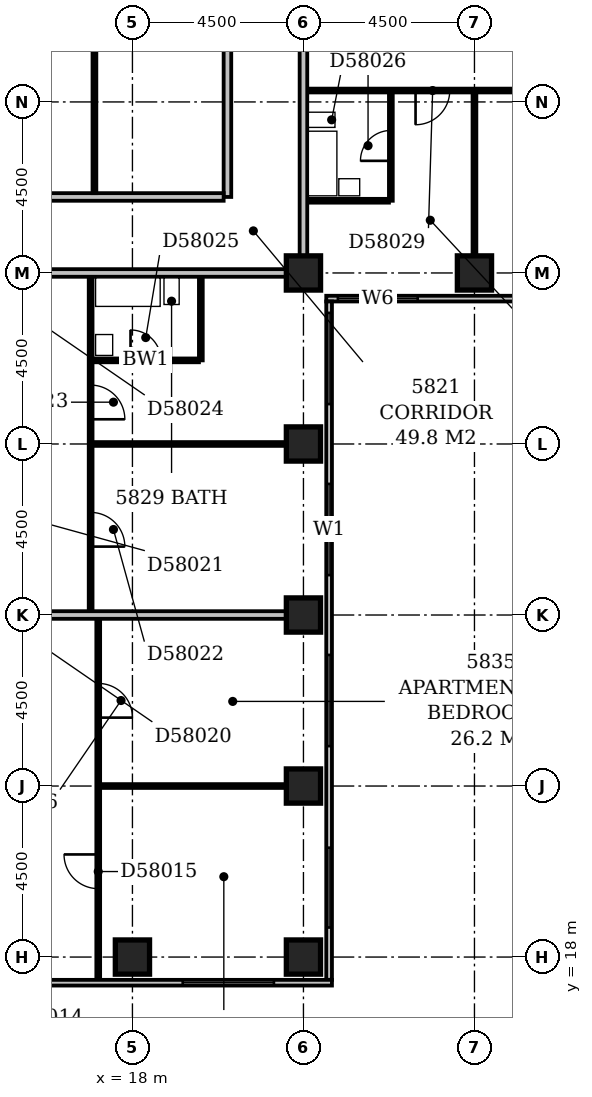
"""IFC4 building model, lengths in metres.
Left out: names, types, materials, properties, quantities, classifications, styles, units other than length and angle.
Written with IfcOpenShell. Run it as: python <this file> out.ifc"""

import sys

from ifc_helpers import new_model, si_unit, direction, frame, frame_2d, origin, origin_2d, place, context, subcontext, project, spatial, rectangle, extrude, element, fill, save


model = new_model("IFC4")
c1 = context("Model", 3, precision=1e-05, world=origin(), true_north=direction((0.0, 1.0)))
c2 = subcontext(c1, "Body", "Model", "MODEL_VIEW")
j1 = project(units=[si_unit("LENGTHUNIT", "METRE"), si_unit("PLANEANGLEUNIT", "RADIAN")], contexts=[c1])
p1 = place(None, origin())
s1 = spatial("IfcSite", under=j1, at=p1, CompositionType="ELEMENT")
p2 = place(p1, origin())
s2 = spatial("IfcBuilding", under=s1, at=p2, CompositionType="ELEMENT")
p3 = place(p2, frame((0.0, 0.0, 225.8)))
s3 = spatial("IfcBuildingStorey", under=s2, at=p3, CompositionType="ELEMENT", Elevation=225.8)
for number, where, z_axis, x_axis in (
    (1, (18.0, 18.0, -0.3), (0.0, 0.0, 1.0), (1.0, 0.0, 0.0)),
    (2, (22.5, 18.0, -0.3), (0.0, 0.0, 1.0), (1.0, 0.0, 0.0)),
    (3, (22.5, 22.5, -0.3), (0.0, 0.0, 1.0), (1.0, 0.0, 0.0)),
    (4, (22.5, 27.0, -0.3), (0.0, 0.0, 1.0), (1.0, 0.0, 0.0)),
    (5, (22.5, 31.5, -0.3), (0.0, 0.0, 1.0), (1.0, 0.0, 0.0)),
    (6, (22.5, 36.0, -0.3), (0.0, 0.0, 1.0), (1.0, 0.0, 0.0)),
    (7, (27.0, 36.0, -0.3), (0.0, 0.0, 1.0), (1.0, 0.0, 0.0)),
):
    element("IfcColumn", number, at=place(p3, frame(where, z_axis=z_axis, x_axis=x_axis)), inside=s3, PredefinedType="COLUMN", context=c2, shape_type="SweptSolid", body=[
        extrude(rectangle(XDim=0.9, YDim=0.9, at=origin_2d()), origin(), (0.0, 0.0, 1.0), 3.6),
    ])
p4 = place(p3, frame((3.9, 17.325, 0.0), z_axis=(0.0, 0.0, 1.0), x_axis=(1.0, 0.0, 0.0)))
e8 = element("IfcWall", 8, at=p4, inside=s3, PredefinedType="STANDARD", context=c2, shape_type="SweptSolid", body=[
    extrude(rectangle(XDim=19.35, YDim=0.15, at=frame_2d((9.675, 0.0))), origin(), (0.0, 0.0, 1.0), 2.7),
])
p5 = place(p4, frame((6.15, 0.0, 0.6)))
e9 = element("IfcOpeningElement", 9, at=p5, cuts=e8, PredefinedType="OPENING", context=c2, shape_type="SweptSolid", body=[
    extrude(rectangle(XDim=2.4, YDim=1.8, at=frame_2d((1.2, 0.9))), frame((0.0, 0.087, 0.0), z_axis=(0.0, -1.0, 0.0), x_axis=(1.0, 0.0, 0.0)), (0.0, 0.0, 1.0), 0.174),
])
p6 = place(p4, frame((15.423, 0.0, 0.6)))
e10 = element("IfcOpeningElement", 10, at=p6, cuts=e8, PredefinedType="OPENING", context=c2, shape_type="SweptSolid", body=[
    extrude(rectangle(XDim=2.4, YDim=1.8, at=frame_2d((1.2, 0.9))), frame((0.0, 0.087, 0.0), z_axis=(0.0, -1.0, 0.0), x_axis=(1.0, 0.0, 0.0)), (0.0, 0.0, 1.0), 0.174),
])
p7 = place(p3, frame((23.175, 17.4, 0.0), z_axis=(0.0, 0.0, 1.0), x_axis=(0.0, 1.0, 0.0)))
e11 = element("IfcWall", 11, at=p7, inside=s3, PredefinedType="STANDARD", context=c2, shape_type="SweptSolid", body=[
    extrude(rectangle(XDim=17.85, YDim=0.15, at=frame_2d((8.925, 0.0))), origin(), (0.0, 0.0, 1.0), 2.7),
])
p8 = place(p7, frame((1.377, 0.0, 0.6)))
e12 = element("IfcOpeningElement", 12, at=p8, cuts=e11, PredefinedType="OPENING", context=c2, shape_type="SweptSolid", body=[
    extrude(rectangle(XDim=2.1, YDim=1.8, at=frame_2d((1.05, 0.9))), frame((0.0, 0.087, 0.0), z_axis=(0.0, -1.0, 0.0), x_axis=(1.0, 0.0, 0.0)), (0.0, 0.0, 1.0), 0.174),
])
p9 = place(p7, frame((6.15, 0.0, 0.6)))
e13 = element("IfcOpeningElement", 13, at=p9, cuts=e11, PredefinedType="OPENING", context=c2, shape_type="SweptSolid", body=[
    extrude(rectangle(XDim=2.4, YDim=1.8, at=frame_2d((1.2, 0.9))), frame((0.0, 0.087, 0.0), z_axis=(0.0, -1.0, 0.0), x_axis=(1.0, 0.0, 0.0)), (0.0, 0.0, 1.0), 0.174),
])
p10 = place(p7, frame((10.65, 0.0, 0.6)))
e14 = element("IfcOpeningElement", 14, at=p10, cuts=e11, PredefinedType="OPENING", context=c2, shape_type="SweptSolid", body=[
    extrude(rectangle(XDim=2.4, YDim=1.8, at=frame_2d((1.2, 0.9))), frame((0.0, 0.087, 0.0), z_axis=(0.0, -1.0, 0.0), x_axis=(1.0, 0.0, 0.0)), (0.0, 0.0, 1.0), 0.174),
])
p11 = place(p7, frame((15.15, 0.0, 0.6)))
e15 = element("IfcOpeningElement", 15, at=p11, cuts=e11, PredefinedType="OPENING", context=c2, shape_type="SweptSolid", body=[
    extrude(rectangle(XDim=2.4, YDim=1.8, at=frame_2d((1.2, 0.9))), frame((0.0, 0.087, 0.0), z_axis=(0.0, -1.0, 0.0), x_axis=(1.0, 0.0, 0.0)), (0.0, 0.0, 1.0), 0.174),
])
p12 = place(p3, frame((23.1, 35.325, 0.0), z_axis=(0.0, 0.0, 1.0), x_axis=(1.0, 0.0, 0.0)))
e16 = element("IfcWall", 16, at=p12, inside=s3, PredefinedType="STANDARD", context=c2, shape_type="SweptSolid", body=[
    extrude(rectangle(XDim=27.15, YDim=0.15, at=frame_2d((13.575, 0.0))), origin(), (0.0, 0.0, 1.0), 2.7),
])
p13 = place(p12, frame((0.306, 0.0, 0.6)))
e17 = element("IfcOpeningElement", 17, at=p13, cuts=e16, PredefinedType="OPENING", context=c2, shape_type="SweptSolid", body=[
    extrude(rectangle(XDim=2.1, YDim=1.8, at=frame_2d((1.05, 0.9))), frame((0.0, 0.087, 0.0), z_axis=(0.0, -1.0, 0.0), x_axis=(1.0, 0.0, 0.0)), (0.0, 0.0, 1.0), 0.174),
])
p14 = place(p12, frame((4.95, 0.0, 0.6)))
e18 = element("IfcOpeningElement", 18, at=p14, cuts=e16, PredefinedType="OPENING", context=c2, shape_type="SweptSolid", body=[
    extrude(rectangle(XDim=2.4, YDim=1.8, at=frame_2d((1.2, 0.9))), frame((0.0, 0.087, 0.0), z_axis=(0.0, -1.0, 0.0), x_axis=(1.0, 0.0, 0.0)), (0.0, 0.0, 1.0), 0.174),
])
p15 = place(p12, frame((9.45, 0.0, 0.6)))
e19 = element("IfcOpeningElement", 19, at=p15, cuts=e16, PredefinedType="OPENING", context=c2, shape_type="SweptSolid", body=[
    extrude(rectangle(XDim=2.4, YDim=1.8, at=frame_2d((1.2, 0.9))), frame((0.0, 0.087, 0.0), z_axis=(0.0, -1.0, 0.0), x_axis=(1.0, 0.0, 0.0)), (0.0, 0.0, 1.0), 0.174),
])
p16 = place(p12, frame((13.95, 0.0, 0.6)))
e20 = element("IfcOpeningElement", 20, at=p16, cuts=e16, PredefinedType="OPENING", context=c2, shape_type="SweptSolid", body=[
    extrude(rectangle(XDim=2.4, YDim=1.8, at=frame_2d((1.2, 0.9))), frame((0.0, 0.087, 0.0), z_axis=(0.0, -1.0, 0.0), x_axis=(1.0, 0.0, 0.0)), (0.0, 0.0, 1.0), 0.174),
])
p17 = place(p12, frame((18.45, 0.0, 0.6)))
e21 = element("IfcOpeningElement", 21, at=p17, cuts=e16, PredefinedType="OPENING", context=c2, shape_type="SweptSolid", body=[
    extrude(rectangle(XDim=2.4, YDim=1.8, at=frame_2d((1.2, 0.9))), frame((0.0, 0.087, 0.0), z_axis=(0.0, -1.0, 0.0), x_axis=(1.0, 0.0, 0.0)), (0.0, 0.0, 1.0), 0.174),
])
p18 = place(p12, frame((24.157, 0.0, 0.6)))
e22 = element("IfcOpeningElement", 22, at=p18, cuts=e16, PredefinedType="OPENING", context=c2, shape_type="SweptSolid", body=[
    extrude(rectangle(XDim=1.5, YDim=1.8, at=frame_2d((0.75, 0.9))), frame((0.0, 0.087, 0.0), z_axis=(0.0, -1.0, 0.0), x_axis=(1.0, 0.0, 0.0)), (0.0, 0.0, 1.0), 0.174),
])
p19 = place(p3, frame((17.1, 17.4, 0.0), z_axis=(0.0, 0.0, 1.0), x_axis=(0.0, 1.0, 0.0)))
e23 = element("IfcWall", 23, at=p19, inside=s3, PredefinedType="PARTITIONING", context=c2, shape_type="SweptSolid", body=[
    extrude(rectangle(XDim=9.5, YDim=0.1, at=frame_2d((4.75, 0.0))), origin(), (0.0, 0.0, 1.0), 3.3),
])
p20 = place(p19, frame((2.4, 0.0, 0.0)))
e24 = element("IfcOpeningElement", 24, at=p20, cuts=e23, PredefinedType="OPENING", context=c2, shape_type="SweptSolid", body=[
    extrude(rectangle(XDim=0.9, YDim=2.1, at=frame_2d((0.45, 1.05))), frame((0.0, 0.062, 0.0), z_axis=(0.0, -1.0, 0.0), x_axis=(1.0, 0.0, 0.0)), (0.0, 0.0, 1.0), 0.124),
])
p21 = place(p19, frame((6.9, 0.0, 0.0)))
e25 = element("IfcOpeningElement", 25, at=p21, cuts=e23, PredefinedType="OPENING", context=c2, shape_type="SweptSolid", body=[
    extrude(rectangle(XDim=0.9, YDim=2.1, at=frame_2d((0.45, 1.05))), frame((0.0, 0.062, 0.0), z_axis=(0.0, -1.0, 0.0), x_axis=(1.0, 0.0, 0.0)), (0.0, 0.0, 1.0), 0.124),
])
p22 = place(p3, frame((17.15, 22.5, 0.0), z_axis=(0.0, 0.0, 1.0), x_axis=(1.0, 0.0, 0.0)))
e26 = element("IfcWall", 26, at=p22, inside=s3, PredefinedType="PARTITIONING", context=c2, shape_type="SweptSolid", body=[
    extrude(rectangle(XDim=4.9, YDim=0.1, at=frame_2d((2.45, 0.0))), origin(), (0.0, 0.0, 1.0), 3.3),
])
p23 = place(p3, frame((9.1, 27.0, 0.0), z_axis=(0.0, 0.0, 1.0), x_axis=(1.0, 0.0, 0.0)))
e27 = element("IfcWall", 27, at=p23, inside=s3, PredefinedType="PARTITIONING", context=c2, shape_type="SweptSolid", body=[
    extrude(rectangle(XDim=12.95, YDim=0.2, at=frame_2d((6.475, 0.0))), origin(), (0.0, 0.0, 1.0), 2.7),
])
p24 = place(p3, frame((16.9, 27.1, 0.0), z_axis=(0.0, 0.0, 1.0), x_axis=(0.0, 1.0, 0.0)))
e28 = element("IfcWall", 28, at=p24, inside=s3, PredefinedType="PARTITIONING", context=c2, shape_type="SweptSolid", body=[
    extrude(rectangle(XDim=8.8, YDim=0.1, at=frame_2d((4.4, 0.0))), origin(), (0.0, 0.0, 1.0), 3.3),
])
p25 = place(p24, frame((1.7, 0.0, 0.0)))
e29 = element("IfcOpeningElement", 29, at=p25, cuts=e28, PredefinedType="OPENING", context=c2, shape_type="SweptSolid", body=[
    extrude(rectangle(XDim=0.9, YDim=2.1, at=frame_2d((0.45, 1.05))), frame((0.0, 0.062, 0.0), z_axis=(0.0, -1.0, 0.0), x_axis=(1.0, 0.0, 0.0)), (0.0, 0.0, 1.0), 0.124),
])
p26 = place(p24, frame((5.05, 0.0, 0.0)))
e30 = element("IfcOpeningElement", 30, at=p26, cuts=e28, PredefinedType="OPENING", context=c2, shape_type="SweptSolid", body=[
    extrude(rectangle(XDim=0.9, YDim=2.1, at=frame_2d((0.45, 1.05))), frame((0.0, 0.062, 0.0), z_axis=(0.0, -1.0, 0.0), x_axis=(1.0, 0.0, 0.0)), (0.0, 0.0, 1.0), 0.124),
])
p27 = place(p3, frame((16.95, 31.5, 0.0), z_axis=(0.0, 0.0, 1.0), x_axis=(1.0, 0.0, 0.0)))
e31 = element("IfcWall", 31, at=p27, inside=s3, PredefinedType="PARTITIONING", context=c2, shape_type="SweptSolid", body=[
    extrude(rectangle(XDim=5.1, YDim=0.1, at=frame_2d((2.55, 0.0))), origin(), (0.0, 0.0, 1.0), 3.3),
])
p28 = place(p3, frame((16.95, 33.7, 0.0), z_axis=(0.0, 0.0, 1.0), x_axis=(1.0, 0.0, 0.0)))
e32 = element("IfcWall", 32, at=p28, inside=s3, PredefinedType="PLUMBINGWALL", context=c2, shape_type="SweptSolid", body=[
    extrude(rectangle(XDim=2.8, YDim=0.1, at=frame_2d((1.4, 0.0))), origin(), (0.0, 0.0, 1.0), 3.3),
])
p29 = place(p28, frame((1.0, 0.0, 0.0)))
e33 = element("IfcOpeningElement", 33, at=p29, cuts=e32, PredefinedType="OPENING", context=c2, shape_type="SweptSolid", body=[
    extrude(rectangle(XDim=0.8, YDim=2.1, at=frame_2d((0.4, 1.05))), frame((0.0, 0.062, 0.0), z_axis=(0.0, -1.0, 0.0), x_axis=(1.0, 0.0, 0.0)), (0.0, 0.0, 1.0), 0.124),
])
p30 = place(p3, frame((19.8, 33.7, 0.0), z_axis=(0.0, 0.0, 1.0), x_axis=(0.0, 1.0, 0.0)))
e34 = element("IfcWall", 34, at=p30, inside=s3, PredefinedType="PLUMBINGWALL", context=c2, shape_type="SweptSolid", body=[
    extrude(rectangle(XDim=2.2, YDim=0.1, at=frame_2d((1.1, 0.0))), origin(), (0.0, 0.0, 1.0), 3.3),
])
p31 = place(p3, frame((9.1, 36.0, 0.0), z_axis=(0.0, 0.0, 1.0), x_axis=(1.0, 0.0, 0.0)))
e35 = element("IfcWall", 35, at=p31, inside=s3, PredefinedType="PARTITIONING", context=c2, shape_type="SweptSolid", body=[
    extrude(rectangle(XDim=12.95, YDim=0.2, at=frame_2d((6.475, 0.0))), origin(), (0.0, 0.0, 1.0), 3.3),
])
p32 = place(p3, frame((22.5, 36.45, 0.0), z_axis=(0.0, 0.0, 1.0), x_axis=(0.0, 1.0, 0.0)))
e36 = element("IfcWall", 36, at=p32, inside=s3, PredefinedType="PARTITIONING", context=c2, shape_type="SweptSolid", body=[
    extrude(rectangle(XDim=13.05, YDim=0.2, at=frame_2d((6.525, 0.0))), origin(), (0.0, 0.0, 1.0), 3.3),
])
p33 = place(p3, frame((27.0, 36.45, 0.0), z_axis=(0.0, 0.0, 1.0), x_axis=(0.0, 1.0, 0.0)))
e37 = element("IfcWall", 37, at=p33, inside=s3, PredefinedType="PARTITIONING", context=c2, shape_type="SweptSolid", body=[
    extrude(rectangle(XDim=4.3, YDim=0.1, at=frame_2d((2.15, 0.0))), origin(), (0.0, 0.0, 1.0), 2.4),
])
p34 = place(p3, frame((22.6, 37.9, 0.0), z_axis=(0.0, 0.0, 1.0), x_axis=(1.0, 0.0, 0.0)))
e38 = element("IfcWall", 38, at=p34, inside=s3, PredefinedType="PLUMBINGWALL", context=c2, shape_type="SweptSolid", body=[
    extrude(rectangle(XDim=2.15, YDim=0.1, at=frame_2d((1.075, 0.0))), origin(), (0.0, 0.0, 1.0), 3.3),
])
p35 = place(p3, frame((24.8, 37.9, 0.0), z_axis=(0.0, 0.0, 1.0), x_axis=(0.0, 1.0, 0.0)))
e39 = element("IfcWall", 39, at=p35, inside=s3, PredefinedType="PLUMBINGWALL", context=c2, shape_type="SweptSolid", body=[
    extrude(rectangle(XDim=2.85, YDim=0.1, at=frame_2d((1.425, 0.0))), origin(), (0.0, 0.0, 1.0), 3.3),
])
p36 = place(p35, frame((1.05, 0.0, 0.0)))
e40 = element("IfcOpeningElement", 40, at=p36, cuts=e39, PredefinedType="OPENING", context=c2, shape_type="SweptSolid", body=[
    extrude(rectangle(XDim=0.8, YDim=2.1, at=frame_2d((0.4, 1.05))), frame((0.0, 0.062, 0.0), z_axis=(0.0, -1.0, 0.0), x_axis=(1.0, 0.0, 0.0)), (0.0, 0.0, 1.0), 0.124),
])
p37 = place(p3, frame((9.1, 38.0, 0.0), z_axis=(0.0, 0.0, 1.0), x_axis=(1.0, 0.0, 0.0)))
e41 = element("IfcWall", 41, at=p37, inside=s3, PredefinedType="PARTITIONING", context=c2, shape_type="SweptSolid", body=[
    extrude(rectangle(XDim=11.3, YDim=0.2, at=frame_2d((5.65, 0.0))), origin(), (0.0, 0.0, 1.0), 3.3),
])
p38 = place(p3, frame((20.5, 38.0, 0.0), z_axis=(0.0, 0.0, 1.0), x_axis=(0.0, 1.0, 0.0)))
e42 = element("IfcWall", 42, at=p38, inside=s3, PredefinedType="PARTITIONING", context=c2, shape_type="SweptSolid", body=[
    extrude(rectangle(XDim=11.5, YDim=0.2, at=frame_2d((5.75, 0.0))), origin(), (0.0, 0.0, 1.0), 3.3),
])
p39 = place(p3, frame((17.0, 38.1, 0.0), z_axis=(0.0, 0.0, 1.0), x_axis=(0.0, 1.0, 0.0)))
e43 = element("IfcWall", 43, at=p39, inside=s3, PredefinedType="PARTITIONING", context=c2, shape_type="SweptSolid", body=[
    extrude(rectangle(XDim=11.3, YDim=0.1, at=frame_2d((5.65, 0.0))), origin(), (0.0, 0.0, 1.0), 3.3),
])
p40 = place(p3, frame((22.6, 40.8, 0.0), z_axis=(0.0, 0.0, 1.0), x_axis=(1.0, 0.0, 0.0)))
e44 = element("IfcWall", 44, at=p40, inside=s3, PredefinedType="PARTITIONING", context=c2, shape_type="SweptSolid", body=[
    extrude(rectangle(XDim=22.3, YDim=0.1, at=frame_2d((11.15, 0.0))), origin(), (0.0, 0.0, 1.0), 3.3),
])
p41 = place(p40, frame((2.85, 0.0, 0.0)))
e45 = element("IfcOpeningElement", 45, at=p41, cuts=e44, PredefinedType="OPENING", context=c2, shape_type="SweptSolid", body=[
    extrude(rectangle(XDim=0.9, YDim=2.1, at=frame_2d((0.45, 1.05))), frame((0.0, 0.062, 0.0), z_axis=(0.0, -1.0, 0.0), x_axis=(1.0, 0.0, 0.0)), (0.0, 0.0, 1.0), 0.124),
])
p42 = place(p40, frame((8.4, 0.0, 0.0)))
e46 = element("IfcOpeningElement", 46, at=p42, cuts=e44, PredefinedType="OPENING", context=c2, shape_type="SweptSolid", body=[
    extrude(rectangle(XDim=0.9, YDim=2.1, at=frame_2d((0.45, 1.05))), frame((0.0, 0.062, 0.0), z_axis=(0.0, -1.0, 0.0), x_axis=(1.0, 0.0, 0.0)), (0.0, 0.0, 1.0), 0.124),
])
p43 = place(p40, frame((14.05, 0.0, 0.0)))
e47 = element("IfcOpeningElement", 47, at=p43, cuts=e44, PredefinedType="OPENING", context=c2, shape_type="SweptSolid", body=[
    extrude(rectangle(XDim=0.9, YDim=2.1, at=frame_2d((0.45, 1.05))), frame((0.0, 0.062, 0.0), z_axis=(0.0, -1.0, 0.0), x_axis=(1.0, 0.0, 0.0)), (0.0, 0.0, 1.0), 0.124),
])
p44 = place(p40, frame((19.7, 0.0, 0.0)))
e48 = element("IfcOpeningElement", 48, at=p44, cuts=e44, PredefinedType="OPENING", context=c2, shape_type="SweptSolid", body=[
    extrude(rectangle(XDim=0.9, YDim=2.1, at=frame_2d((0.45, 1.05))), frame((0.0, 0.062, 0.0), z_axis=(0.0, -1.0, 0.0), x_axis=(1.0, 0.0, 0.0)), (0.0, 0.0, 1.0), 0.124),
])
p45 = place(p6, origin())
e49 = element("IfcWindow", 49, at=p45, inside=s3, PartitioningType="SINGLE_PANEL", PredefinedType="WINDOW", context=c2, shape_type="SweptSolid", body=[
    extrude(rectangle(XDim=2.4, YDim=1.8, at=frame_2d((1.2, 0.9))), frame((0.0, 0.03, 0.0), z_axis=(0.0, -1.0, 0.0), x_axis=(1.0, 0.0, 0.0)), (0.0, 0.0, 1.0), 0.06),
])
fill(e10, e49)
p46 = place(p8, origin())
e50 = element("IfcWindow", 50, at=p46, inside=s3, PartitioningType="SINGLE_PANEL", PredefinedType="WINDOW", context=c2, shape_type="SweptSolid", body=[
    extrude(rectangle(XDim=2.1, YDim=1.8, at=frame_2d((1.05, 0.9))), frame((0.0, 0.03, 0.0), z_axis=(0.0, -1.0, 0.0), x_axis=(1.0, 0.0, 0.0)), (0.0, 0.0, 1.0), 0.06),
])
fill(e12, e50)
p47 = place(p9, origin())
e51 = element("IfcWindow", 51, at=p47, inside=s3, PartitioningType="SINGLE_PANEL", PredefinedType="WINDOW", context=c2, shape_type="SweptSolid", body=[
    extrude(rectangle(XDim=2.4, YDim=1.8, at=frame_2d((1.2, 0.9))), frame((0.0, 0.03, 0.0), z_axis=(0.0, -1.0, 0.0), x_axis=(1.0, 0.0, 0.0)), (0.0, 0.0, 1.0), 0.06),
])
fill(e13, e51)
p48 = place(p10, origin())
e52 = element("IfcWindow", 52, at=p48, inside=s3, PartitioningType="SINGLE_PANEL", PredefinedType="WINDOW", context=c2, shape_type="SweptSolid", body=[
    extrude(rectangle(XDim=2.4, YDim=1.8, at=frame_2d((1.2, 0.9))), frame((0.0, 0.03, 0.0), z_axis=(0.0, -1.0, 0.0), x_axis=(1.0, 0.0, 0.0)), (0.0, 0.0, 1.0), 0.06),
])
fill(e14, e52)
p49 = place(p11, origin())
e53 = element("IfcWindow", 53, at=p49, inside=s3, PartitioningType="SINGLE_PANEL", PredefinedType="WINDOW", context=c2, shape_type="SweptSolid", body=[
    extrude(rectangle(XDim=2.4, YDim=1.8, at=frame_2d((1.2, 0.9))), frame((0.0, 0.03, 0.0), z_axis=(0.0, -1.0, 0.0), x_axis=(1.0, 0.0, 0.0)), (0.0, 0.0, 1.0), 0.06),
])
fill(e15, e53)
p50 = place(p13, origin())
e54 = element("IfcWindow", 54, at=p50, inside=s3, PartitioningType="SINGLE_PANEL", PredefinedType="WINDOW", context=c2, shape_type="SweptSolid", body=[
    extrude(rectangle(XDim=2.1, YDim=1.8, at=frame_2d((1.05, 0.9))), frame((0.0, 0.03, 0.0), z_axis=(0.0, -1.0, 0.0), x_axis=(1.0, 0.0, 0.0)), (0.0, 0.0, 1.0), 0.06),
])
fill(e17, e54)
p51 = place(p20, frame((0.9, 0.0, 0.0), z_axis=(0.0, 0.0, 1.0), x_axis=(-1.0, 0.0, 0.0)))
e55 = element("IfcDoor", 55, at=p51, inside=s3, OperationType="SINGLE_SWING_LEFT", PredefinedType="DOOR", context=c2, shape_type="SweptSolid", body=[
    extrude(rectangle(XDim=0.9, YDim=2.1, at=frame_2d((0.45, 1.05))), frame((0.0, 0.025, 0.0), z_axis=(0.0, -1.0, 0.0), x_axis=(1.0, 0.0, 0.0)), (0.0, 0.0, 1.0), 0.05),
])
fill(e24, e55)
p52 = place(p21, frame((0.9, 0.0, 0.0), z_axis=(0.0, 0.0, 1.0), x_axis=(-1.0, 0.0, 0.0)))
e56 = element("IfcDoor", 56, at=p52, inside=s3, OperationType="SINGLE_SWING_RIGHT", PredefinedType="DOOR", context=c2, shape_type="SweptSolid", body=[
    extrude(rectangle(XDim=0.9, YDim=2.1, at=frame_2d((0.45, 1.05))), frame((0.0, 0.025, 0.0), z_axis=(0.0, -1.0, 0.0), x_axis=(1.0, 0.0, 0.0)), (0.0, 0.0, 1.0), 0.05),
])
fill(e25, e56)
p53 = place(p25, frame((0.9, 0.0, 0.0), z_axis=(0.0, 0.0, 1.0), x_axis=(-1.0, 0.0, 0.0)))
e57 = element("IfcDoor", 57, at=p53, inside=s3, OperationType="SINGLE_SWING_RIGHT", PredefinedType="DOOR", context=c2, shape_type="SweptSolid", body=[
    extrude(rectangle(XDim=0.9, YDim=2.1, at=frame_2d((0.45, 1.05))), frame((0.0, 0.025, 0.0), z_axis=(0.0, -1.0, 0.0), x_axis=(1.0, 0.0, 0.0)), (0.0, 0.0, 1.0), 0.05),
])
fill(e29, e57)
p54 = place(p26, frame((0.9, 0.0, 0.0), z_axis=(0.0, 0.0, 1.0), x_axis=(-1.0, 0.0, 0.0)))
e58 = element("IfcDoor", 58, at=p54, inside=s3, OperationType="SINGLE_SWING_RIGHT", PredefinedType="DOOR", context=c2, shape_type="SweptSolid", body=[
    extrude(rectangle(XDim=0.9, YDim=2.1, at=frame_2d((0.45, 1.05))), frame((0.0, 0.025, 0.0), z_axis=(0.0, -1.0, 0.0), x_axis=(1.0, 0.0, 0.0)), (0.0, 0.0, 1.0), 0.05),
])
fill(e30, e58)
p55 = place(p29, origin())
e59 = element("IfcDoor", 59, at=p55, inside=s3, OperationType="SINGLE_SWING_LEFT", PredefinedType="DOOR", context=c2, shape_type="SweptSolid", body=[
    extrude(rectangle(XDim=0.8, YDim=2.1, at=frame_2d((0.4, 1.05))), frame((0.0, 0.025, 0.0), z_axis=(0.0, -1.0, 0.0), x_axis=(1.0, 0.0, 0.0)), (0.0, 0.0, 1.0), 0.05),
])
fill(e33, e59)
p56 = place(p36, origin())
e60 = element("IfcDoor", 60, at=p56, inside=s3, OperationType="SINGLE_SWING_LEFT", PredefinedType="DOOR", context=c2, shape_type="SweptSolid", body=[
    extrude(rectangle(XDim=0.8, YDim=2.1, at=frame_2d((0.4, 1.05))), frame((0.0, 0.025, 0.0), z_axis=(0.0, -1.0, 0.0), x_axis=(1.0, 0.0, 0.0)), (0.0, 0.0, 1.0), 0.05),
])
fill(e40, e60)
p57 = place(p41, frame((0.9, 0.0, 0.0), z_axis=(0.0, 0.0, 1.0), x_axis=(-1.0, 0.0, 0.0)))
e61 = element("IfcDoor", 61, at=p57, inside=s3, OperationType="SINGLE_SWING_RIGHT", PredefinedType="DOOR", context=c2, shape_type="SweptSolid", body=[
    extrude(rectangle(XDim=0.9, YDim=2.1, at=frame_2d((0.45, 1.05))), frame((0.0, 0.025, 0.0), z_axis=(0.0, -1.0, 0.0), x_axis=(1.0, 0.0, 0.0)), (0.0, 0.0, 1.0), 0.05),
])
fill(e45, e61)
save(model, sys.argv[1])
